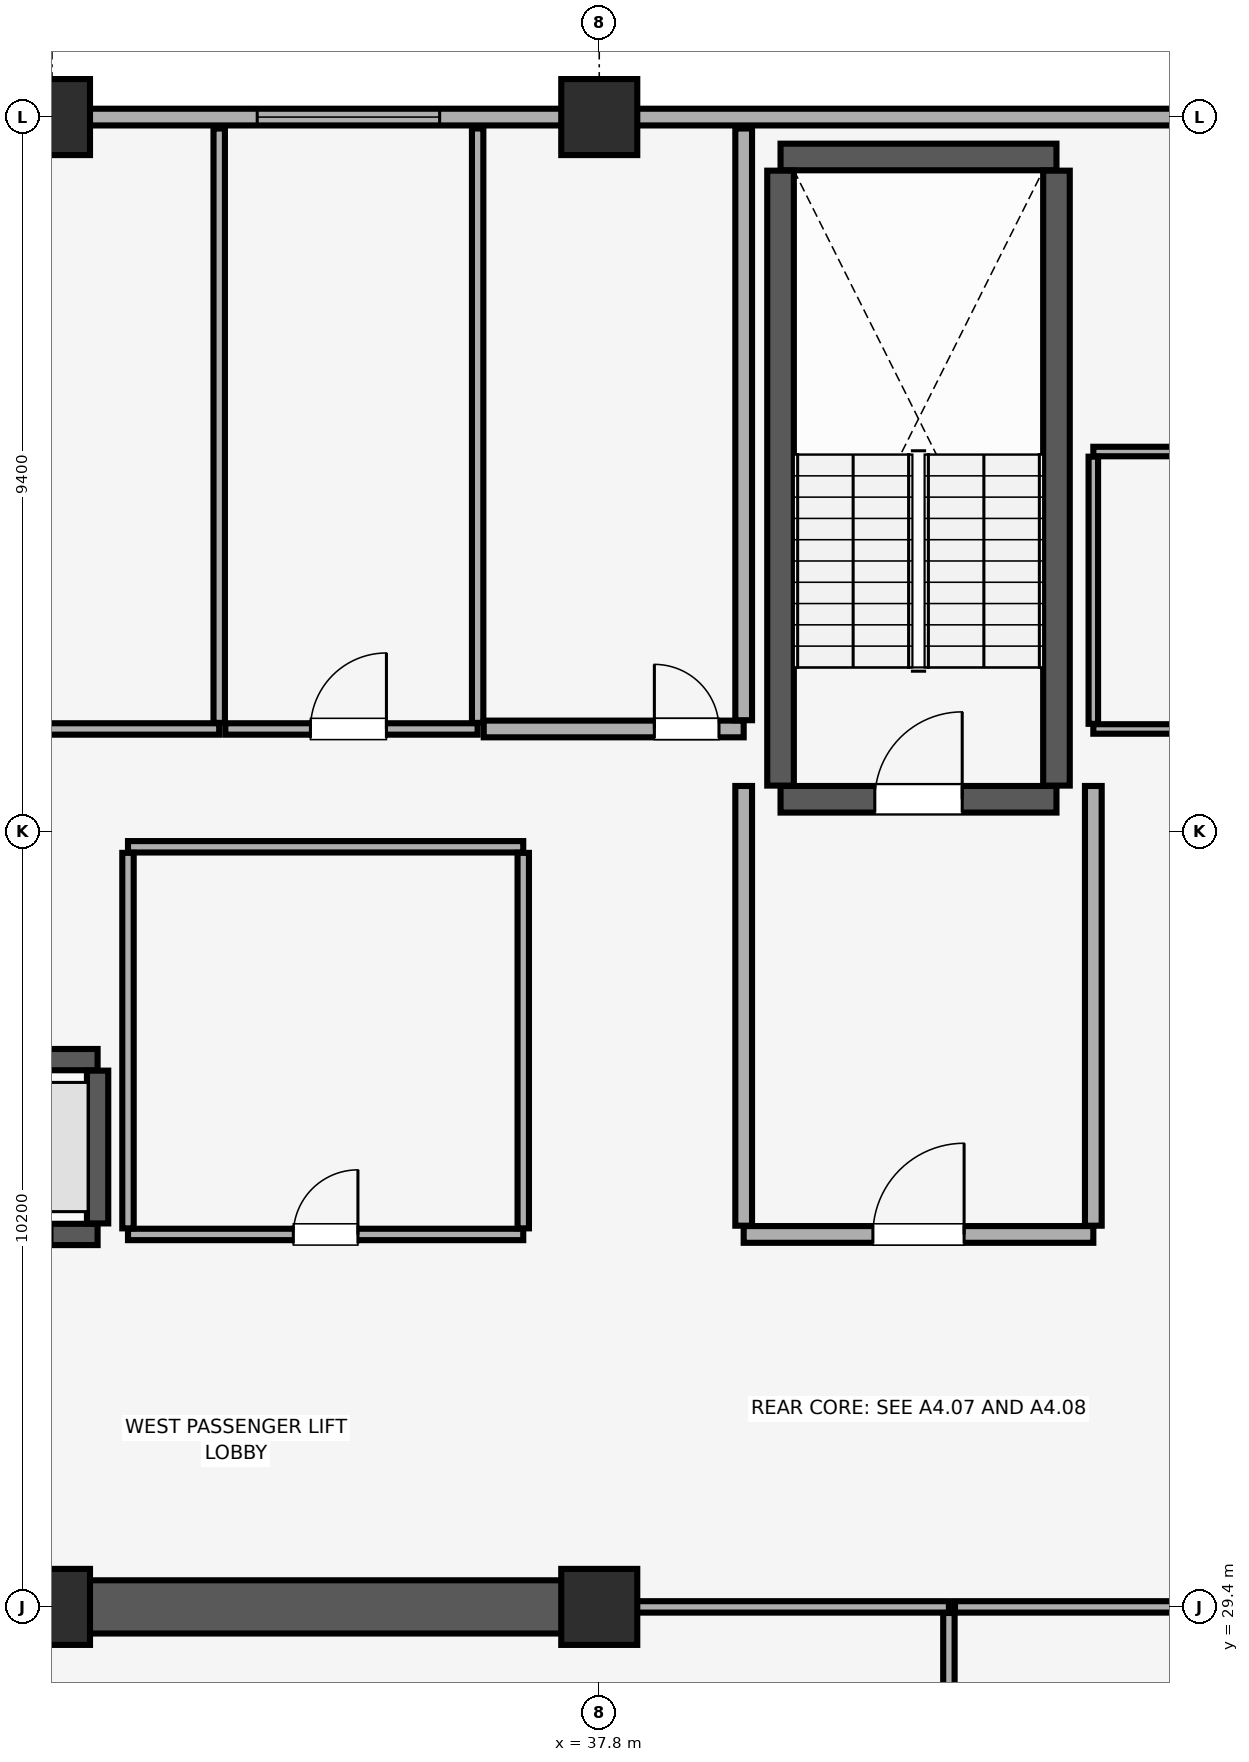
"""IFC4 building model, lengths in metres.
Left out: names, types, materials, properties, quantities, classifications, styles, units other than length and angle.
Written with IfcOpenShell. Run it as: python <this file> out.ifc"""

import sys

from ifc_helpers import new_model, si_unit, direction, frame, frame_2d, origin, origin_2d, place, context, subcontext, project, spatial, rectangle, extrude, element, fill, save


model = new_model("IFC4")
c1 = context("Model", 3, precision=1e-05, world=origin(), true_north=direction((0.0, 1.0)))
c2 = subcontext(c1, "Body", "Model", "MODEL_VIEW")
j1 = project(units=[si_unit("LENGTHUNIT", "METRE"), si_unit("PLANEANGLEUNIT", "RADIAN")], contexts=[c1])
p1 = place(None, origin())
s1 = spatial("IfcSite", under=j1, at=p1, CompositionType="ELEMENT")
p2 = place(p1, origin())
s2 = spatial("IfcBuilding", under=s1, at=p2, CompositionType="ELEMENT")
p3 = place(p2, frame((0.0, 0.0, 229.15)))
s3 = spatial("IfcBuildingStorey", under=s2, at=p3, CompositionType="ELEMENT", Elevation=229.15)
for number, where, z_axis, x_axis in (
    (1, (30.6, 29.4, 0.0), (0.0, 0.0, 1.0), (1.0, 0.0, 0.0)),
    (2, (30.6, 49.0, 0.0), (0.0, 0.0, 1.0), (1.0, 0.0, 0.0)),
    (3, (37.8, 29.4, 0.0), (0.0, 0.0, 1.0), (1.0, 0.0, 0.0)),
    (4, (37.8, 49.0, 0.0), (0.0, 0.0, 1.0), (1.0, 0.0, 0.0)),
):
    element("IfcColumn", number, at=place(p3, frame(where, z_axis=z_axis, x_axis=x_axis)), inside=s3, PredefinedType="COLUMN", context=c2, shape_type="SweptSolid", body=[
        extrude(rectangle(XDim=1.0, YDim=1.0, at=origin_2d()), origin(), (0.0, 0.0, 1.0), 3.71),
    ])
p4 = place(p3, frame((74.2, 49.0, 0.0), z_axis=(0.0, 0.0, 1.0), x_axis=(-1.0, 0.0, 0.0)))
e5 = element("IfcWall", 5, at=p4, inside=s3, PredefinedType="SOLIDWALL", context=c2, shape_type="SweptSolid", body=[
    extrude(rectangle(XDim=64.4, YDim=0.22, at=frame_2d((32.2, 0.0))), origin(), (0.0, 0.0, 1.0), 2.91),
])
p5 = place(p4, frame((59.815, 0.0, 0.85)))
e6 = element("IfcOpeningElement", 6, at=p5, cuts=e5, PredefinedType="OPENING", context=c2, shape_type="SweptSolid", body=[
    extrude(rectangle(XDim=3.0, YDim=1.5, at=frame_2d((1.5, 0.75))), frame((0.0, 0.12, 0.0), z_axis=(0.0, -1.0, 0.0), x_axis=(1.0, 0.0, 0.0)), (0.0, 0.0, 1.0), 0.24),
])
p6 = place(p4, frame((1.585, 0.0, 0.85)))
e7 = element("IfcOpeningElement", 7, at=p6, cuts=e5, PredefinedType="OPENING", context=c2, shape_type="SweptSolid", body=[
    extrude(rectangle(XDim=3.0, YDim=1.5, at=frame_2d((1.5, 0.75))), frame((0.0, 0.12, 0.0), z_axis=(0.0, -1.0, 0.0), x_axis=(1.0, 0.0, 0.0)), (0.0, 0.0, 1.0), 0.24),
])
p7 = place(p4, frame((44.715, 0.0, 0.9)))
e8 = element("IfcOpeningElement", 8, at=p7, cuts=e5, PredefinedType="OPENING", context=c2, shape_type="SweptSolid", body=[
    extrude(rectangle(XDim=3.6, YDim=1.5, at=frame_2d((1.8, 0.75))), frame((0.0, 0.12, 0.0), z_axis=(0.0, -1.0, 0.0), x_axis=(1.0, 0.0, 0.0)), (0.0, 0.0, 1.0), 0.24),
])
p8 = place(p4, frame((38.5, 0.0, 0.9)))
e9 = element("IfcOpeningElement", 9, at=p8, cuts=e5, PredefinedType="OPENING", context=c2, shape_type="SweptSolid", body=[
    extrude(rectangle(XDim=2.4, YDim=1.5, at=frame_2d((1.2, 0.75))), frame((0.0, 0.12, 0.0), z_axis=(0.0, -1.0, 0.0), x_axis=(1.0, 0.0, 0.0)), (0.0, 0.0, 1.0), 0.24),
])
p9 = place(p4, frame((21.75, 0.0, 0.9)))
e10 = element("IfcOpeningElement", 10, at=p9, cuts=e5, PredefinedType="OPENING", context=c2, shape_type="SweptSolid", body=[
    extrude(rectangle(XDim=3.0, YDim=1.5, at=frame_2d((1.5, 0.75))), frame((0.0, 0.12, 0.0), z_axis=(0.0, -1.0, 0.0), x_axis=(1.0, 0.0, 0.0)), (0.0, 0.0, 1.0), 0.24),
])
p10 = place(p4, frame((17.435, 0.0, 0.9)))
e11 = element("IfcOpeningElement", 11, at=p10, cuts=e5, PredefinedType="OPENING", context=c2, shape_type="SweptSolid", body=[
    extrude(rectangle(XDim=2.4, YDim=1.5, at=frame_2d((1.2, 0.75))), frame((0.0, 0.12, 0.0), z_axis=(0.0, -1.0, 0.0), x_axis=(1.0, 0.0, 0.0)), (0.0, 0.0, 1.0), 0.24),
])
p11 = place(p3, frame((30.4, 29.4, 0.0), z_axis=(0.0, 0.0, 1.0), x_axis=(1.0, 0.0, 0.0)))
e12 = element("IfcWall", 12, at=p11, inside=s3, PredefinedType="SHEAR", context=c2, shape_type="SweptSolid", body=[
    extrude(rectangle(XDim=7.6, YDim=0.7, at=frame_2d((3.8, 0.0))), origin(), (0.0, 0.0, 1.0), 3.71),
])
p12 = place(p3, frame((40.185, 40.025, 0.0), z_axis=(0.0, 0.0, 1.0), x_axis=(1.0, 0.0, 0.0)))
e13 = element("IfcWall", 13, at=p12, inside=s3, PredefinedType="SHEAR", context=c2, shape_type="SweptSolid", body=[
    extrude(rectangle(XDim=3.63, YDim=0.35, at=frame_2d((1.815, 0.0))), origin(), (0.0, 0.0, 1.0), 3.71),
])
p13 = place(p12, frame((1.24, 0.0, 0.0)))
e14 = element("IfcOpeningElement", 14, at=p13, cuts=e13, PredefinedType="OPENING", context=c2, shape_type="SweptSolid", body=[
    extrude(rectangle(XDim=1.15, YDim=2.15, at=frame_2d((0.575, 1.075))), frame((0.0, 0.185, 0.0), z_axis=(0.0, -1.0, 0.0), x_axis=(1.0, 0.0, 0.0)), (0.0, 0.0, 1.0), 0.37),
])
p14 = place(p3, frame((40.185, 48.475, 0.0), z_axis=(0.0, 0.0, 1.0), x_axis=(1.0, 0.0, 0.0)))
e15 = element("IfcWall", 15, at=p14, inside=s3, PredefinedType="SHEAR", context=c2, shape_type="SweptSolid", body=[
    extrude(rectangle(XDim=3.63, YDim=0.35, at=frame_2d((1.815, 0.0))), origin(), (0.0, 0.0, 1.0), 3.71),
])
for number, where, z_axis, x_axis in (
    (16, (40.185, 40.205, 0.0), (0.0, 0.0, 1.0), (0.0, 1.0, 0.0)),
    (17, (43.815, 40.205, 0.0), (0.0, 0.0, 1.0), (0.0, 1.0, 0.0)),
):
    element("IfcWall", number, at=place(p3, frame(where, z_axis=z_axis, x_axis=x_axis)), inside=s3, PredefinedType="SHEAR", context=c2, shape_type="SweptSolid", body=[
        extrude(rectangle(XDim=8.09, YDim=0.35, at=frame_2d((4.045, 0.0))), origin(), (0.0, 0.0, 1.0), 3.71),
    ])
p15 = place(p3, frame((28.9, 34.3, 0.0), z_axis=(0.0, 0.0, 1.0), x_axis=(1.0, 0.0, 0.0)))
e18 = element("IfcWall", 18, at=p15, inside=s3, PredefinedType="SHEAR", context=c2, shape_type="SweptSolid", body=[
    extrude(rectangle(XDim=2.3, YDim=0.28, at=frame_2d((1.15, 0.0))), origin(), (0.0, 0.0, 1.0), 3.71),
])
p16 = place(p15, frame((0.6, 0.0, 0.0)))
e19 = element("IfcOpeningElement", 19, at=p16, cuts=e18, PredefinedType="OPENING", context=c2, shape_type="SweptSolid", body=[
    extrude(rectangle(XDim=1.1, YDim=2.2, at=frame_2d((0.55, 1.1))), frame((0.0, 0.15, 0.0), z_axis=(0.0, -1.0, 0.0), x_axis=(1.0, 0.0, 0.0)), (0.0, 0.0, 1.0), 0.3),
])
p17 = place(p3, frame((28.9, 36.6, 0.0), z_axis=(0.0, 0.0, 1.0), x_axis=(1.0, 0.0, 0.0)))
e20 = element("IfcWall", 20, at=p17, inside=s3, PredefinedType="SHEAR", context=c2, shape_type="SweptSolid", body=[
    extrude(rectangle(XDim=2.3, YDim=0.28, at=frame_2d((1.15, 0.0))), origin(), (0.0, 0.0, 1.0), 3.71),
])
p18 = place(p3, frame((31.2, 34.445, 0.0), z_axis=(0.0, 0.0, 1.0), x_axis=(0.0, 1.0, 0.0)))
e21 = element("IfcWall", 21, at=p18, inside=s3, PredefinedType="SHEAR", context=c2, shape_type="SweptSolid", body=[
    extrude(rectangle(XDim=2.01, YDim=0.28, at=frame_2d((1.005, 0.0))), origin(), (0.0, 0.0, 1.0), 3.71),
])
p19 = place(p3, frame((39.7, 34.3, 0.0), z_axis=(0.0, 0.0, 1.0), x_axis=(1.0, 0.0, 0.0)))
e22 = element("IfcWall", 22, at=p19, inside=s3, PredefinedType="PARTITIONING", context=c2, shape_type="SweptSolid", body=[
    extrude(rectangle(XDim=4.6, YDim=0.22, at=frame_2d((2.3, 0.0))), origin(), (0.0, 0.0, 1.0), 3.71),
])
p20 = place(p19, frame((1.7, 0.0, 0.0)))
e23 = element("IfcOpeningElement", 23, at=p20, cuts=e22, PredefinedType="OPENING", context=c2, shape_type="SweptSolid", body=[
    extrude(rectangle(XDim=1.2, YDim=2.15, at=frame_2d((0.6, 1.075))), frame((0.0, 0.12, 0.0), z_axis=(0.0, -1.0, 0.0), x_axis=(1.0, 0.0, 0.0)), (0.0, 0.0, 1.0), 0.24),
])
for number, where, z_axis, x_axis in (
    (24, (39.7, 34.415, 0.0), (0.0, 0.0, 1.0), (0.0, 1.0, 0.0)),
    (25, (44.3, 34.415, 0.0), (0.0, 0.0, 1.0), (0.0, 1.0, 0.0)),
):
    element("IfcWall", number, at=place(p3, frame(where, z_axis=z_axis, x_axis=x_axis)), inside=s3, PredefinedType="PARTITIONING", context=c2, shape_type="SweptSolid", body=[
        extrude(rectangle(XDim=5.785, YDim=0.22, at=frame_2d((2.893, 0.0))), origin(), (0.0, 0.0, 1.0), 3.71),
    ])
p21 = place(p3, frame((31.6, 34.3, 0.0), z_axis=(0.0, 0.0, 1.0), x_axis=(1.0, 0.0, 0.0)))
e26 = element("IfcWall", 26, at=p21, inside=s3, PredefinedType="PARTITIONING", context=c2, shape_type="SweptSolid", body=[
    extrude(rectangle(XDim=5.2, YDim=0.15, at=frame_2d((2.6, 0.0))), origin(), (0.0, 0.0, 1.0), 3.71),
])
p22 = place(p21, frame((2.175, 0.0, 0.0)))
e27 = element("IfcOpeningElement", 27, at=p22, cuts=e26, PredefinedType="OPENING", context=c2, shape_type="SweptSolid", body=[
    extrude(rectangle(XDim=0.85, YDim=2.1, at=frame_2d((0.425, 1.05))), frame((0.0, 0.085, 0.0), z_axis=(0.0, -1.0, 0.0), x_axis=(1.0, 0.0, 0.0)), (0.0, 0.0, 1.0), 0.17),
])
p23 = place(p3, frame((31.6, 39.4, 0.0), z_axis=(0.0, 0.0, 1.0), x_axis=(1.0, 0.0, 0.0)))
e28 = element("IfcWall", 28, at=p23, inside=s3, PredefinedType="PARTITIONING", context=c2, shape_type="SweptSolid", body=[
    extrude(rectangle(XDim=5.2, YDim=0.15, at=frame_2d((2.6, 0.0))), origin(), (0.0, 0.0, 1.0), 3.71),
])
for number, where, z_axis, x_axis in (
    (29, (31.6, 34.38, 0.0), (0.0, 0.0, 1.0), (0.0, 1.0, 0.0)),
    (30, (36.8, 34.38, 0.0), (0.0, 0.0, 1.0), (0.0, 1.0, 0.0)),
):
    element("IfcWall", number, at=place(p3, frame(where, z_axis=z_axis, x_axis=x_axis)), inside=s3, PredefinedType="PARTITIONING", context=c2, shape_type="SweptSolid", body=[
        extrude(rectangle(XDim=4.94, YDim=0.15, at=frame_2d((2.47, 0.0))), origin(), (0.0, 0.0, 1.0), 3.71),
    ])
p24 = place(p3, frame((25.0, 40.95, 0.0), z_axis=(0.0, 0.0, 1.0), x_axis=(1.0, 0.0, 0.0)))
e31 = element("IfcWall", 31, at=p24, inside=s3, PredefinedType="PARTITIONING", context=c2, shape_type="SweptSolid", body=[
    extrude(rectangle(XDim=7.8, YDim=0.15, at=frame_2d((3.9, 0.0))), origin(), (0.0, 0.0, 1.0), 3.71),
])
p25 = place(p24, frame((3.475, 0.0, 0.0)))
e32 = element("IfcOpeningElement", 32, at=p25, cuts=e31, PredefinedType="OPENING", context=c2, shape_type="SweptSolid", body=[
    extrude(rectangle(XDim=0.85, YDim=2.1, at=frame_2d((0.425, 1.05))), frame((0.0, 0.085, 0.0), z_axis=(0.0, -1.0, 0.0), x_axis=(1.0, 0.0, 0.0)), (0.0, 0.0, 1.0), 0.17),
])
p26 = place(p3, frame((32.8, 41.03, 0.0), z_axis=(0.0, 0.0, 1.0), x_axis=(0.0, 1.0, 0.0)))
e33 = element("IfcWall", 33, at=p26, inside=s3, PredefinedType="PARTITIONING", context=c2, shape_type="SweptSolid", body=[
    extrude(rectangle(XDim=7.82, YDim=0.15, at=frame_2d((3.91, 0.0))), origin(), (0.0, 0.0, 1.0), 3.71),
])
p27 = place(p3, frame((32.88, 40.95, 0.0), z_axis=(0.0, 0.0, 1.0), x_axis=(1.0, 0.0, 0.0)))
e34 = element("IfcWall", 34, at=p27, inside=s3, PredefinedType="PARTITIONING", context=c2, shape_type="SweptSolid", body=[
    extrude(rectangle(XDim=3.32, YDim=0.15, at=frame_2d((1.66, 0.0))), origin(), (0.0, 0.0, 1.0), 3.71),
])
p28 = place(p27, frame((1.12, 0.0, 0.0)))
e35 = element("IfcOpeningElement", 35, at=p28, cuts=e34, PredefinedType="OPENING", context=c2, shape_type="SweptSolid", body=[
    extrude(rectangle(XDim=1.0, YDim=2.15, at=frame_2d((0.5, 1.075))), frame((0.0, 0.085, 0.0), z_axis=(0.0, -1.0, 0.0), x_axis=(1.0, 0.0, 0.0)), (0.0, 0.0, 1.0), 0.17),
])
p29 = place(p3, frame((36.2, 41.03, 0.0), z_axis=(0.0, 0.0, 1.0), x_axis=(0.0, 1.0, 0.0)))
e36 = element("IfcWall", 36, at=p29, inside=s3, PredefinedType="PARTITIONING", context=c2, shape_type="SweptSolid", body=[
    extrude(rectangle(XDim=7.82, YDim=0.15, at=frame_2d((3.91, 0.0))), origin(), (0.0, 0.0, 1.0), 3.71),
])
p30 = place(p3, frame((36.28, 40.95, 0.0), z_axis=(0.0, 0.0, 1.0), x_axis=(1.0, 0.0, 0.0)))
e37 = element("IfcWall", 37, at=p30, inside=s3, PredefinedType="PARTITIONING", context=c2, shape_type="SweptSolid", body=[
    extrude(rectangle(XDim=3.42, YDim=0.22, at=frame_2d((1.71, 0.0))), origin(), (0.0, 0.0, 1.0), 3.71),
])
p31 = place(p30, frame((2.245, 0.0, 0.0)))
e38 = element("IfcOpeningElement", 38, at=p31, cuts=e37, PredefinedType="OPENING", context=c2, shape_type="SweptSolid", body=[
    extrude(rectangle(XDim=0.85, YDim=2.1, at=frame_2d((0.425, 1.05))), frame((0.0, 0.12, 0.0), z_axis=(0.0, -1.0, 0.0), x_axis=(1.0, 0.0, 0.0)), (0.0, 0.0, 1.0), 0.24),
])
p32 = place(p3, frame((39.7, 41.065, 0.0), z_axis=(0.0, 0.0, 1.0), x_axis=(0.0, 1.0, 0.0)))
e39 = element("IfcWall", 39, at=p32, inside=s3, PredefinedType="PARTITIONING", context=c2, shape_type="SweptSolid", body=[
    extrude(rectangle(XDim=7.785, YDim=0.22, at=frame_2d((3.893, 0.0))), origin(), (0.0, 0.0, 1.0), 3.71),
])
p33 = place(p3, frame((44.3, 40.95, 0.0), z_axis=(0.0, 0.0, 1.0), x_axis=(1.0, 0.0, 0.0)))
e40 = element("IfcWall", 40, at=p33, inside=s3, PredefinedType="PARTITIONING", context=c2, shape_type="SweptSolid", body=[
    extrude(rectangle(XDim=4.6, YDim=0.125, at=frame_2d((2.3, 0.0))), origin(), (0.0, 0.0, 1.0), 3.71),
])
p34 = place(p33, frame((2.85, 0.0, 0.0)))
e41 = element("IfcOpeningElement", 41, at=p34, cuts=e40, PredefinedType="OPENING", context=c2, shape_type="SweptSolid", body=[
    extrude(rectangle(XDim=0.9, YDim=2.1, at=frame_2d((0.45, 1.05))), frame((0.0, 0.073, 0.0), z_axis=(0.0, -1.0, 0.0), x_axis=(1.0, 0.0, 0.0)), (0.0, 0.0, 1.0), 0.145),
])
p35 = place(p3, frame((44.3, 44.6, 0.0), z_axis=(0.0, 0.0, 1.0), x_axis=(1.0, 0.0, 0.0)))
e42 = element("IfcWall", 42, at=p35, inside=s3, PredefinedType="PARTITIONING", context=c2, shape_type="SweptSolid", body=[
    extrude(rectangle(XDim=4.6, YDim=0.125, at=frame_2d((2.3, 0.0))), origin(), (0.0, 0.0, 1.0), 3.71),
])
p36 = place(p3, frame((44.3, 41.018, 0.0), z_axis=(0.0, 0.0, 1.0), x_axis=(0.0, 1.0, 0.0)))
e43 = element("IfcWall", 43, at=p36, inside=s3, PredefinedType="PARTITIONING", context=c2, shape_type="SweptSolid", body=[
    extrude(rectangle(XDim=3.515, YDim=0.125, at=frame_2d((1.757, 0.0))), origin(), (0.0, 0.0, 1.0), 3.71),
])
p37 = place(p3, frame((38.01, 29.4, 0.0), z_axis=(0.0, 0.0, 1.0), x_axis=(1.0, 0.0, 0.0)))
e44 = element("IfcWall", 44, at=p37, inside=s3, PredefinedType="PARTITIONING", context=c2, shape_type="SweptSolid", body=[
    extrude(rectangle(XDim=4.39, YDim=0.15, at=frame_2d((2.195, 0.0))), origin(), (0.0, 0.0, 1.0), 2.61),
])
p38 = place(p3, frame((42.4, 13.68, 0.0), z_axis=(0.0, 0.0, 1.0), x_axis=(0.0, 1.0, 0.0)))
e45 = element("IfcWall", 45, at=p38, inside=s3, PredefinedType="PARTITIONING", context=c2, shape_type="SweptSolid", body=[
    extrude(rectangle(XDim=15.64, YDim=0.15, at=frame_2d((7.82, 0.0))), origin(), (0.0, 0.0, 1.0), 3.71),
])
p39 = place(p3, frame((42.48, 29.4, 0.0), z_axis=(0.0, 0.0, 1.0), x_axis=(1.0, 0.0, 0.0)))
e46 = element("IfcWall", 46, at=p39, inside=s3, PredefinedType="PARTITIONING", context=c2, shape_type="SweptSolid", body=[
    extrude(rectangle(XDim=3.51, YDim=0.15, at=frame_2d((1.755, 0.0))), origin(), (0.0, 0.0, 1.0), 2.61),
])
p40 = place(p8, origin())
e47 = element("IfcWindow", 47, at=p40, inside=s3, PartitioningType="SINGLE_PANEL", PredefinedType="WINDOW", context=c2, shape_type="SweptSolid", body=[
    extrude(rectangle(XDim=2.4, YDim=1.5, at=frame_2d((1.2, 0.75))), frame((0.0, 0.03, 0.0), z_axis=(0.0, -1.0, 0.0), x_axis=(1.0, 0.0, 0.0)), (0.0, 0.0, 1.0), 0.06),
])
fill(e9, e47)
p41 = place(p13, origin())
e48 = element("IfcDoor", 48, at=p41, inside=s3, OperationType="SINGLE_SWING_RIGHT", PredefinedType="DOOR", context=c2, shape_type="SweptSolid", body=[
    extrude(rectangle(XDim=1.15, YDim=2.15, at=frame_2d((0.575, 1.075))), frame((0.0, 0.025, 0.0), z_axis=(0.0, -1.0, 0.0), x_axis=(1.0, 0.0, 0.0)), (0.0, 0.0, 1.0), 0.05),
])
fill(e14, e48)
p42 = place(p20, origin())
e49 = element("IfcDoor", 49, at=p42, inside=s3, OperationType="SINGLE_SWING_RIGHT", PredefinedType="DOOR", context=c2, shape_type="SweptSolid", body=[
    extrude(rectangle(XDim=1.2, YDim=2.15, at=frame_2d((0.6, 1.075))), frame((0.0, 0.025, 0.0), z_axis=(0.0, -1.0, 0.0), x_axis=(1.0, 0.0, 0.0)), (0.0, 0.0, 1.0), 0.05),
])
fill(e23, e49)
p43 = place(p22, origin())
e50 = element("IfcDoor", 50, at=p43, inside=s3, OperationType="SINGLE_SWING_RIGHT", PredefinedType="DOOR", context=c2, shape_type="SweptSolid", body=[
    extrude(rectangle(XDim=0.85, YDim=2.1, at=frame_2d((0.425, 1.05))), frame((0.0, 0.025, 0.0), z_axis=(0.0, -1.0, 0.0), x_axis=(1.0, 0.0, 0.0)), (0.0, 0.0, 1.0), 0.05),
])
fill(e27, e50)
p44 = place(p28, origin())
e51 = element("IfcDoor", 51, at=p44, inside=s3, OperationType="SINGLE_SWING_RIGHT", PredefinedType="DOOR", context=c2, shape_type="SweptSolid", body=[
    extrude(rectangle(XDim=1.0, YDim=2.15, at=frame_2d((0.5, 1.075))), frame((0.0, 0.025, 0.0), z_axis=(0.0, -1.0, 0.0), x_axis=(1.0, 0.0, 0.0)), (0.0, 0.0, 1.0), 0.05),
])
fill(e35, e51)
p45 = place(p31, origin())
e52 = element("IfcDoor", 52, at=p45, inside=s3, OperationType="SINGLE_SWING_LEFT", PredefinedType="DOOR", context=c2, shape_type="SweptSolid", body=[
    extrude(rectangle(XDim=0.85, YDim=2.1, at=frame_2d((0.425, 1.05))), frame((0.0, 0.025, 0.0), z_axis=(0.0, -1.0, 0.0), x_axis=(1.0, 0.0, 0.0)), (0.0, 0.0, 1.0), 0.05),
])
fill(e38, e52)
save(model, sys.argv[1])
